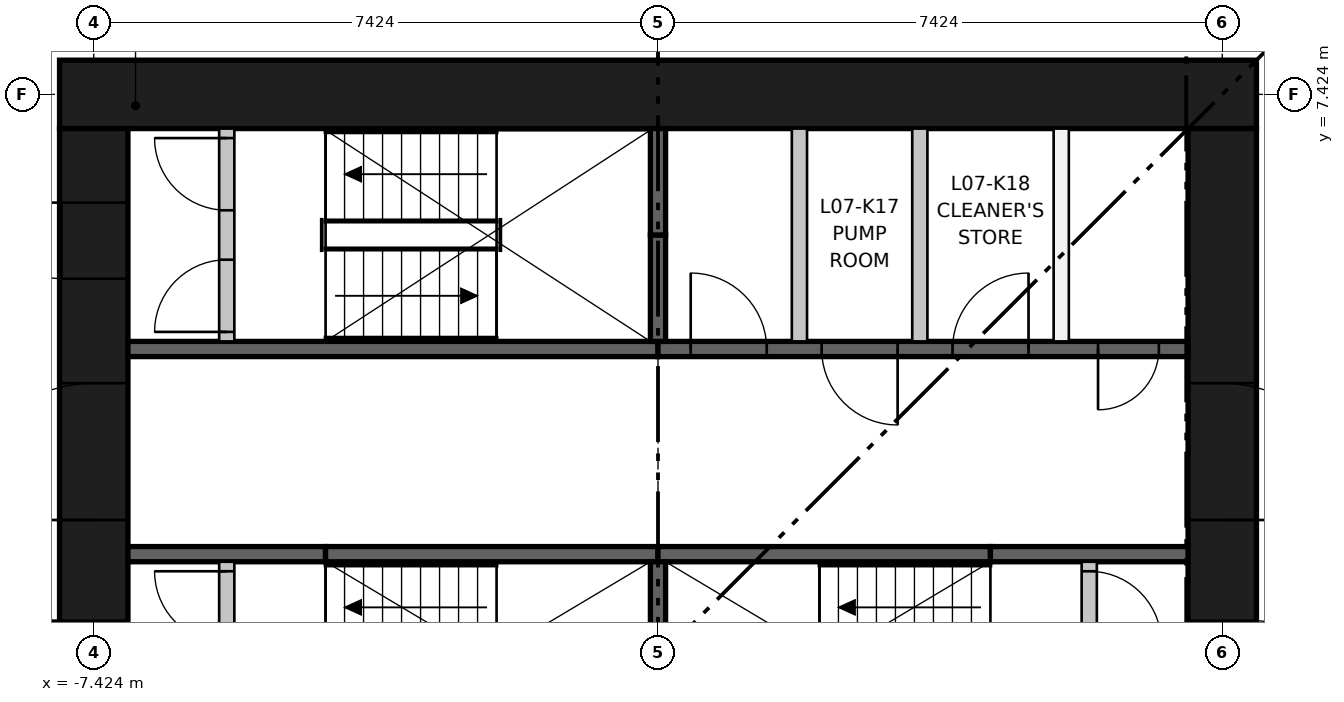
"""IFC4 building model, lengths in metres.
Left out: names, types, materials, properties, quantities, classifications, styles, units other than length and angle.
Written with IfcOpenShell. Run it as: python <this file> out.ifc"""

import sys

from ifc_helpers import new_model, si_unit, direction, frame, frame_2d, origin, place, context, subcontext, project, spatial, rectangle, extrude, element, fill, save


model = new_model("IFC4")
c1 = context("Model", 3, precision=1e-05, world=origin(), true_north=direction((0.0, 1.0)))
c2 = subcontext(c1, "Body", "Model", "MODEL_VIEW")
j1 = project(units=[si_unit("LENGTHUNIT", "METRE"), si_unit("PLANEANGLEUNIT", "RADIAN")], contexts=[c1])
p1 = place(None, origin())
s1 = spatial("IfcSite", under=j1, at=p1, CompositionType="ELEMENT")
p2 = place(p1, origin())
s2 = spatial("IfcBuilding", under=s1, at=p2, CompositionType="ELEMENT")
p3 = place(p2, frame((0.0, 0.0, 29.85)))
s3 = spatial("IfcBuildingStorey", under=s2, at=p3, CompositionType="ELEMENT", Elevation=29.85)
p4 = place(p3, frame((-7.874, 7.424, 0.0), z_axis=(0.0, 0.0, 1.0), x_axis=(1.0, 0.0, 0.0)))
e1 = element("IfcWall", 1, at=p4, inside=s3, PredefinedType="SHEAR", context=c2, shape_type="SweptSolid", body=[
    extrude(rectangle(XDim=15.748, YDim=0.9, at=frame_2d((7.874, 0.0))), origin(), (0.0, 0.0, 1.0), 3.65),
])
p5 = place(p3, frame((-7.424, -6.974, 0.0), z_axis=(0.0, 0.0, 1.0), x_axis=(0.0, 1.0, 0.0)))
e2 = element("IfcWall", 2, at=p5, inside=s3, PredefinedType="SHEAR", context=c2, shape_type="SweptSolid", body=[
    extrude(rectangle(XDim=13.948, YDim=0.9, at=frame_2d((6.974, 0.0))), origin(), (0.0, 0.0, 1.0), 3.65),
])
p6 = place(p5, frame((6.474, 0.0, 0.0)))
e3 = element("IfcOpeningElement", 3, at=p6, cuts=e2, PredefinedType="OPENING", context=c2, shape_type="SweptSolid", body=[
    extrude(rectangle(XDim=1.0, YDim=2.1, at=frame_2d((0.5, 1.05))), frame((0.0, 0.46, 0.0), z_axis=(0.0, -1.0, 0.0), x_axis=(1.0, 0.0, 0.0)), (0.0, 0.0, 1.0), 0.92),
])
p7 = place(p5, frame((3.35, 0.0, 0.0)))
e4 = element("IfcOpeningElement", 4, at=p7, cuts=e2, PredefinedType="OPENING", context=c2, shape_type="SweptSolid", body=[
    extrude(rectangle(XDim=1.8, YDim=2.1, at=frame_2d((0.9, 1.05))), frame((0.0, 0.46, 0.0), z_axis=(0.0, -1.0, 0.0), x_axis=(1.0, 0.0, 0.0)), (0.0, 0.0, 1.0), 0.92),
])
p8 = place(p5, frame((8.799, 0.0, 0.0)))
e5 = element("IfcOpeningElement", 5, at=p8, cuts=e2, PredefinedType="OPENING", context=c2, shape_type="SweptSolid", body=[
    extrude(rectangle(XDim=1.8, YDim=2.1, at=frame_2d((0.9, 1.05))), frame((0.0, 0.46, 0.0), z_axis=(0.0, -1.0, 0.0), x_axis=(1.0, 0.0, 0.0)), (0.0, 0.0, 1.0), 0.92),
])
p9 = place(p5, frame((11.974, 0.0, 0.0)))
e6 = element("IfcOpeningElement", 6, at=p9, cuts=e2, PredefinedType="OPENING", context=c2, shape_type="SweptSolid", body=[
    extrude(rectangle(XDim=1.0, YDim=2.1, at=frame_2d((0.5, 1.05))), frame((0.0, 0.46, 0.0), z_axis=(0.0, -1.0, 0.0), x_axis=(1.0, 0.0, 0.0)), (0.0, 0.0, 1.0), 0.92),
])
p10 = place(p3, frame((7.424, -6.974, 0.0), z_axis=(0.0, 0.0, 1.0), x_axis=(0.0, 1.0, 0.0)))
e7 = element("IfcWall", 7, at=p10, inside=s3, PredefinedType="SHEAR", context=c2, shape_type="SweptSolid", body=[
    extrude(rectangle(XDim=13.948, YDim=0.9, at=frame_2d((6.974, 0.0))), origin(), (0.0, 0.0, 1.0), 3.65),
])
p11 = place(p10, frame((6.474, 0.0, 0.0)))
e8 = element("IfcOpeningElement", 8, at=p11, cuts=e7, PredefinedType="OPENING", context=c2, shape_type="SweptSolid", body=[
    extrude(rectangle(XDim=1.0, YDim=2.1, at=frame_2d((0.5, 1.05))), frame((0.0, 0.46, 0.0), z_axis=(0.0, -1.0, 0.0), x_axis=(1.0, 0.0, 0.0)), (0.0, 0.0, 1.0), 0.92),
])
p12 = place(p10, frame((3.35, 0.0, 0.0)))
e9 = element("IfcOpeningElement", 9, at=p12, cuts=e7, PredefinedType="OPENING", context=c2, shape_type="SweptSolid", body=[
    extrude(rectangle(XDim=1.8, YDim=2.1, at=frame_2d((0.9, 1.05))), frame((0.0, 0.46, 0.0), z_axis=(0.0, -1.0, 0.0), x_axis=(1.0, 0.0, 0.0)), (0.0, 0.0, 1.0), 0.92),
])
p13 = place(p10, frame((8.799, 0.0, 0.0)))
e10 = element("IfcOpeningElement", 10, at=p13, cuts=e7, PredefinedType="OPENING", context=c2, shape_type="SweptSolid", body=[
    extrude(rectangle(XDim=1.8, YDim=2.1, at=frame_2d((0.9, 1.05))), frame((0.0, 0.46, 0.0), z_axis=(0.0, -1.0, 0.0), x_axis=(1.0, 0.0, 0.0)), (0.0, 0.0, 1.0), 0.92),
])
p14 = place(p3, frame((-6.974, 4.074, 0.0), z_axis=(0.0, 0.0, 1.0), x_axis=(1.0, 0.0, 0.0)))
e11 = element("IfcWall", 11, at=p14, inside=s3, PredefinedType="SHEAR", context=c2, shape_type="SweptSolid", body=[
    extrude(rectangle(XDim=6.974, YDim=0.2, at=frame_2d((3.487, 0.0))), origin(), (0.0, 0.0, 1.0), 3.3),
])
p15 = place(p3, frame((0.0, 4.074, 0.0), z_axis=(0.0, 0.0, 1.0), x_axis=(1.0, 0.0, 0.0)))
e12 = element("IfcWall", 12, at=p15, inside=s3, PredefinedType="SHEAR", context=c2, shape_type="SweptSolid", body=[
    extrude(rectangle(XDim=6.974, YDim=0.2, at=frame_2d((3.487, 0.0))), origin(), (0.0, 0.0, 1.0), 3.3),
])
p16 = place(p15, frame((0.43, 0.0, 0.0)))
e13 = element("IfcOpeningElement", 13, at=p16, cuts=e12, PredefinedType="OPENING", context=c2, shape_type="SweptSolid", body=[
    extrude(rectangle(XDim=1.0, YDim=2.1, at=frame_2d((0.5, 1.05))), frame((0.0, 0.11, 0.0), z_axis=(0.0, -1.0, 0.0), x_axis=(1.0, 0.0, 0.0)), (0.0, 0.0, 1.0), 0.22),
])
p17 = place(p15, frame((2.153, 0.0, 0.0)))
e14 = element("IfcOpeningElement", 14, at=p17, cuts=e12, PredefinedType="OPENING", context=c2, shape_type="SweptSolid", body=[
    extrude(rectangle(XDim=1.0, YDim=2.1, at=frame_2d((0.5, 1.05))), frame((0.0, 0.11, 0.0), z_axis=(0.0, -1.0, 0.0), x_axis=(1.0, 0.0, 0.0)), (0.0, 0.0, 1.0), 0.22),
])
p18 = place(p15, frame((3.875, 0.0, 0.0)))
e15 = element("IfcOpeningElement", 15, at=p18, cuts=e12, PredefinedType="OPENING", context=c2, shape_type="SweptSolid", body=[
    extrude(rectangle(XDim=1.0, YDim=2.1, at=frame_2d((0.5, 1.05))), frame((0.0, 0.11, 0.0), z_axis=(0.0, -1.0, 0.0), x_axis=(1.0, 0.0, 0.0)), (0.0, 0.0, 1.0), 0.22),
])
p19 = place(p15, frame((5.79, 0.0, 0.0)))
e16 = element("IfcOpeningElement", 16, at=p19, cuts=e12, PredefinedType="OPENING", context=c2, shape_type="SweptSolid", body=[
    extrude(rectangle(XDim=0.8, YDim=2.1, at=frame_2d((0.4, 1.05))), frame((0.0, 0.11, 0.0), z_axis=(0.0, -1.0, 0.0), x_axis=(1.0, 0.0, 0.0)), (0.0, 0.0, 1.0), 0.22),
])
p20 = place(p3, frame((-6.974, 1.375, 0.0), z_axis=(0.0, 0.0, 1.0), x_axis=(1.0, 0.0, 0.0)))
e17 = element("IfcWall", 17, at=p20, inside=s3, PredefinedType="SHEAR", context=c2, shape_type="SweptSolid", body=[
    extrude(rectangle(XDim=2.6, YDim=0.2, at=frame_2d((1.3, 0.0))), origin(), (0.0, 0.0, 1.0), 3.3),
])
for number, where, z_axis, x_axis in (
    (18, (-4.374, 1.375, 0.0), (0.0, 0.0, 1.0), (1.0, 0.0, 0.0)),
    (19, (0.0, 1.375, 0.0), (0.0, 0.0, 1.0), (1.0, 0.0, 0.0)),
):
    element("IfcWall", number, at=place(p3, frame(where, z_axis=z_axis, x_axis=x_axis)), inside=s3, PredefinedType="SHEAR", context=c2, shape_type="SweptSolid", body=[
        extrude(rectangle(XDim=4.374, YDim=0.2, at=frame_2d((2.187, 0.0))), origin(), (0.0, 0.0, 1.0), 3.3),
    ])
p21 = place(p3, frame((4.374, 1.375, 0.0), z_axis=(0.0, 0.0, 1.0), x_axis=(1.0, 0.0, 0.0)))
e20 = element("IfcWall", 20, at=p21, inside=s3, PredefinedType="SHEAR", context=c2, shape_type="SweptSolid", body=[
    extrude(rectangle(XDim=2.6, YDim=0.2, at=frame_2d((1.3, 0.0))), origin(), (0.0, 0.0, 1.0), 3.3),
])
p22 = place(p3, frame((0.0, -1.275, 0.0), z_axis=(0.0, 0.0, 1.0), x_axis=(0.0, 1.0, 0.0)))
e21 = element("IfcWall", 21, at=p22, inside=s3, PredefinedType="SHEAR", context=c2, shape_type="SweptSolid", body=[
    extrude(rectangle(XDim=2.55, YDim=0.2, at=frame_2d((1.275, 0.0))), origin(), (0.0, 0.0, 1.0), 3.3),
])
p23 = place(p3, frame((0.0, 4.174, 0.0), z_axis=(0.0, 0.0, 1.0), x_axis=(0.0, 1.0, 0.0)))
e22 = element("IfcWall", 22, at=p23, inside=s3, PredefinedType="SHEAR", context=c2, shape_type="SweptSolid", body=[
    extrude(rectangle(XDim=1.4, YDim=0.2, at=frame_2d((0.7, 0.0))), origin(), (0.0, 0.0, 1.0), 3.3),
])
p24 = place(p3, frame((0.0, 5.574, 0.0), z_axis=(0.0, 0.0, 1.0), x_axis=(0.0, 1.0, 0.0)))
e23 = element("IfcWall", 23, at=p24, inside=s3, PredefinedType="SHEAR", context=c2, shape_type="SweptSolid", body=[
    extrude(rectangle(XDim=1.4, YDim=0.2, at=frame_2d((0.7, 0.0))), origin(), (0.0, 0.0, 1.0), 3.3),
])
for number, where, z_axis, x_axis in (
    (24, (1.861, 4.174, 0.0), (0.0, 0.0, 1.0), (0.0, 1.0, 0.0)),
    (25, (3.445, 4.174, 0.0), (0.0, 0.0, 1.0), (0.0, 1.0, 0.0)),
    (26, (5.305, 4.174, 0.0), (0.0, 0.0, 1.0), (0.0, 1.0, 0.0)),
):
    element("IfcWall", number, at=place(p3, frame(where, z_axis=z_axis, x_axis=x_axis)), inside=s3, PredefinedType="PARTITIONING", context=c2, shape_type="SweptSolid", body=[
        extrude(rectangle(XDim=2.8, YDim=0.2, at=frame_2d((1.4, 0.0))), origin(), (0.0, 0.0, 1.0), 3.3),
    ])
p25 = place(p3, frame((-5.674, -1.275, 0.0), z_axis=(0.0, 0.0, 1.0), x_axis=(0.0, 1.0, 0.0)))
e27 = element("IfcWall", 27, at=p25, inside=s3, PredefinedType="PARTITIONING", context=c2, shape_type="SweptSolid", body=[
    extrude(rectangle(XDim=2.55, YDim=0.2, at=frame_2d((1.275, 0.0))), origin(), (0.0, 0.0, 1.0), 3.3),
])
p26 = place(p25, frame((0.125, 0.0, 0.0)))
e28 = element("IfcOpeningElement", 28, at=p26, cuts=e27, PredefinedType="OPENING", context=c2, shape_type="SweptSolid", body=[
    extrude(rectangle(XDim=0.95, YDim=2.1, at=frame_2d((0.475, 1.05))), frame((0.0, 0.11, 0.0), z_axis=(0.0, -1.0, 0.0), x_axis=(1.0, 0.0, 0.0)), (0.0, 0.0, 1.0), 0.22),
])
p27 = place(p25, frame((1.475, 0.0, 0.0)))
e29 = element("IfcOpeningElement", 29, at=p27, cuts=e27, PredefinedType="OPENING", context=c2, shape_type="SweptSolid", body=[
    extrude(rectangle(XDim=0.95, YDim=2.1, at=frame_2d((0.475, 1.05))), frame((0.0, 0.11, 0.0), z_axis=(0.0, -1.0, 0.0), x_axis=(1.0, 0.0, 0.0)), (0.0, 0.0, 1.0), 0.22),
])
p28 = place(p3, frame((5.674, -1.275, 0.0), z_axis=(0.0, 0.0, 1.0), x_axis=(0.0, 1.0, 0.0)))
e30 = element("IfcWall", 30, at=p28, inside=s3, PredefinedType="PARTITIONING", context=c2, shape_type="SweptSolid", body=[
    extrude(rectangle(XDim=2.55, YDim=0.2, at=frame_2d((1.275, 0.0))), origin(), (0.0, 0.0, 1.0), 3.3),
])
p29 = place(p28, frame((0.125, 0.0, 0.0)))
e31 = element("IfcOpeningElement", 31, at=p29, cuts=e30, PredefinedType="OPENING", context=c2, shape_type="SweptSolid", body=[
    extrude(rectangle(XDim=0.95, YDim=2.1, at=frame_2d((0.475, 1.05))), frame((0.0, 0.11, 0.0), z_axis=(0.0, -1.0, 0.0), x_axis=(1.0, 0.0, 0.0)), (0.0, 0.0, 1.0), 0.22),
])
p30 = place(p28, frame((1.475, 0.0, 0.0)))
e32 = element("IfcOpeningElement", 32, at=p30, cuts=e30, PredefinedType="OPENING", context=c2, shape_type="SweptSolid", body=[
    extrude(rectangle(XDim=0.95, YDim=2.1, at=frame_2d((0.475, 1.05))), frame((0.0, 0.11, 0.0), z_axis=(0.0, -1.0, 0.0), x_axis=(1.0, 0.0, 0.0)), (0.0, 0.0, 1.0), 0.22),
])
p31 = place(p3, frame((-5.674, 4.174, 0.0), z_axis=(0.0, 0.0, 1.0), x_axis=(0.0, 1.0, 0.0)))
e33 = element("IfcWall", 33, at=p31, inside=s3, PredefinedType="PARTITIONING", context=c2, shape_type="SweptSolid", body=[
    extrude(rectangle(XDim=2.8, YDim=0.2, at=frame_2d((1.4, 0.0))), origin(), (0.0, 0.0, 1.0), 3.3),
])
p32 = place(p31, frame((0.125, 0.0, 0.0)))
e34 = element("IfcOpeningElement", 34, at=p32, cuts=e33, PredefinedType="OPENING", context=c2, shape_type="SweptSolid", body=[
    extrude(rectangle(XDim=0.95, YDim=2.1, at=frame_2d((0.475, 1.05))), frame((0.0, 0.11, 0.0), z_axis=(0.0, -1.0, 0.0), x_axis=(1.0, 0.0, 0.0)), (0.0, 0.0, 1.0), 0.22),
])
p33 = place(p31, frame((1.725, 0.0, 0.0)))
e35 = element("IfcOpeningElement", 35, at=p33, cuts=e33, PredefinedType="OPENING", context=c2, shape_type="SweptSolid", body=[
    extrude(rectangle(XDim=0.95, YDim=2.1, at=frame_2d((0.475, 1.05))), frame((0.0, 0.11, 0.0), z_axis=(0.0, -1.0, 0.0), x_axis=(1.0, 0.0, 0.0)), (0.0, 0.0, 1.0), 0.22),
])
p34 = place(p27, origin())
e36 = element("IfcDoor", 36, at=p34, inside=s3, OperationType="SINGLE_SWING_RIGHT", PredefinedType="DOOR", context=c2, shape_type="SweptSolid", body=[
    extrude(rectangle(XDim=0.95, YDim=2.1, at=frame_2d((0.475, 1.05))), frame((0.0, 0.025, 0.0), z_axis=(0.0, -1.0, 0.0), x_axis=(1.0, 0.0, 0.0)), (0.0, 0.0, 1.0), 0.05),
])
fill(e29, e36)
p35 = place(p30, frame((0.95, 0.0, 0.0), z_axis=(0.0, 0.0, 1.0), x_axis=(-1.0, 0.0, 0.0)))
e37 = element("IfcDoor", 37, at=p35, inside=s3, OperationType="SINGLE_SWING_LEFT", PredefinedType="DOOR", context=c2, shape_type="SweptSolid", body=[
    extrude(rectangle(XDim=0.95, YDim=2.1, at=frame_2d((0.475, 1.05))), frame((0.0, 0.025, 0.0), z_axis=(0.0, -1.0, 0.0), x_axis=(1.0, 0.0, 0.0)), (0.0, 0.0, 1.0), 0.05),
])
fill(e32, e37)
p36 = place(p32, origin())
e38 = element("IfcDoor", 38, at=p36, inside=s3, OperationType="SINGLE_SWING_LEFT", PredefinedType="DOOR", context=c2, shape_type="SweptSolid", body=[
    extrude(rectangle(XDim=0.95, YDim=2.1, at=frame_2d((0.475, 1.05))), frame((0.0, 0.025, 0.0), z_axis=(0.0, -1.0, 0.0), x_axis=(1.0, 0.0, 0.0)), (0.0, 0.0, 1.0), 0.05),
])
fill(e34, e38)
p37 = place(p33, origin())
e39 = element("IfcDoor", 39, at=p37, inside=s3, OperationType="SINGLE_SWING_RIGHT", PredefinedType="DOOR", context=c2, shape_type="SweptSolid", body=[
    extrude(rectangle(XDim=0.95, YDim=2.1, at=frame_2d((0.475, 1.05))), frame((0.0, 0.025, 0.0), z_axis=(0.0, -1.0, 0.0), x_axis=(1.0, 0.0, 0.0)), (0.0, 0.0, 1.0), 0.05),
])
fill(e35, e39)
p38 = place(p16, origin())
e40 = element("IfcDoor", 40, at=p38, inside=s3, OperationType="SINGLE_SWING_LEFT", PredefinedType="DOOR", context=c2, shape_type="SweptSolid", body=[
    extrude(rectangle(XDim=1.0, YDim=2.1, at=frame_2d((0.5, 1.05))), frame((0.0, 0.025, 0.0), z_axis=(0.0, -1.0, 0.0), x_axis=(1.0, 0.0, 0.0)), (0.0, 0.0, 1.0), 0.05),
])
fill(e13, e40)
p39 = place(p17, frame((1.0, 0.0, 0.0), z_axis=(0.0, 0.0, 1.0), x_axis=(-1.0, 0.0, 0.0)))
e41 = element("IfcDoor", 41, at=p39, inside=s3, OperationType="SINGLE_SWING_RIGHT", PredefinedType="DOOR", context=c2, shape_type="SweptSolid", body=[
    extrude(rectangle(XDim=1.0, YDim=2.1, at=frame_2d((0.5, 1.05))), frame((0.0, 0.025, 0.0), z_axis=(0.0, -1.0, 0.0), x_axis=(1.0, 0.0, 0.0)), (0.0, 0.0, 1.0), 0.05),
])
fill(e14, e41)
p40 = place(p18, origin())
e42 = element("IfcDoor", 42, at=p40, inside=s3, OperationType="SINGLE_SWING_RIGHT", PredefinedType="DOOR", context=c2, shape_type="SweptSolid", body=[
    extrude(rectangle(XDim=1.0, YDim=2.1, at=frame_2d((0.5, 1.05))), frame((0.0, 0.025, 0.0), z_axis=(0.0, -1.0, 0.0), x_axis=(1.0, 0.0, 0.0)), (0.0, 0.0, 1.0), 0.05),
])
fill(e15, e42)
p41 = place(p19, frame((0.8, 0.0, 0.0), z_axis=(0.0, 0.0, 1.0), x_axis=(-1.0, 0.0, 0.0)))
e43 = element("IfcDoor", 43, at=p41, inside=s3, OperationType="SINGLE_SWING_LEFT", PredefinedType="DOOR", context=c2, shape_type="SweptSolid", body=[
    extrude(rectangle(XDim=0.8, YDim=2.1, at=frame_2d((0.4, 1.05))), frame((0.0, 0.025, 0.0), z_axis=(0.0, -1.0, 0.0), x_axis=(1.0, 0.0, 0.0)), (0.0, 0.0, 1.0), 0.05),
])
fill(e16, e43)
p42 = place(p6, origin())
e44 = element("IfcDoor", 44, at=p42, inside=s3, OperationType="SINGLE_SWING_RIGHT", PredefinedType="DOOR", context=c2, shape_type="SweptSolid", body=[
    extrude(rectangle(XDim=1.0, YDim=2.1, at=frame_2d((0.5, 1.05))), frame((0.0, 0.45, 0.0), z_axis=(0.0, -1.0, 0.0), x_axis=(1.0, 0.0, 0.0)), (0.0, 0.0, 1.0), 0.05),
])
fill(e3, e44)
p43 = place(p8, origin())
e45 = element("IfcDoor", 45, at=p43, inside=s3, OperationType="DOUBLE_DOOR_SINGLE_SWING", PredefinedType="DOOR", context=c2, shape_type="SweptSolid", body=[
    extrude(rectangle(XDim=1.8, YDim=2.1, at=frame_2d((0.9, 1.05))), frame((0.0, 0.025, 0.0), z_axis=(0.0, -1.0, 0.0), x_axis=(1.0, 0.0, 0.0)), (0.0, 0.0, 1.0), 0.05),
])
fill(e5, e45)
p44 = place(p9, origin())
e46 = element("IfcDoor", 46, at=p44, inside=s3, OperationType="SINGLE_SWING_RIGHT", PredefinedType="DOOR", context=c2, shape_type="SweptSolid", body=[
    extrude(rectangle(XDim=1.0, YDim=2.1, at=frame_2d((0.5, 1.05))), frame((0.0, 0.45, 0.0), z_axis=(0.0, -1.0, 0.0), x_axis=(1.0, 0.0, 0.0)), (0.0, 0.0, 1.0), 0.05),
])
fill(e6, e46)
p45 = place(p11, frame((1.0, 0.0, 0.0), z_axis=(0.0, 0.0, 1.0), x_axis=(-1.0, 0.0, 0.0)))
e47 = element("IfcDoor", 47, at=p45, inside=s3, OperationType="SINGLE_SWING_LEFT", PredefinedType="DOOR", context=c2, shape_type="SweptSolid", body=[
    extrude(rectangle(XDim=1.0, YDim=2.1, at=frame_2d((0.5, 1.05))), frame((0.0, 0.45, 0.0), z_axis=(0.0, -1.0, 0.0), x_axis=(1.0, 0.0, 0.0)), (0.0, 0.0, 1.0), 0.05),
])
fill(e8, e47)
p46 = place(p13, frame((1.8, 0.0, 0.0), z_axis=(0.0, 0.0, 1.0), x_axis=(-1.0, 0.0, 0.0)))
e48 = element("IfcDoor", 48, at=p46, inside=s3, OperationType="DOUBLE_DOOR_SINGLE_SWING", PredefinedType="DOOR", context=c2, shape_type="SweptSolid", body=[
    extrude(rectangle(XDim=1.8, YDim=2.1, at=frame_2d((0.9, 1.05))), frame((0.0, 0.025, 0.0), z_axis=(0.0, -1.0, 0.0), x_axis=(1.0, 0.0, 0.0)), (0.0, 0.0, 1.0), 0.05),
])
fill(e10, e48)
save(model, sys.argv[1])
